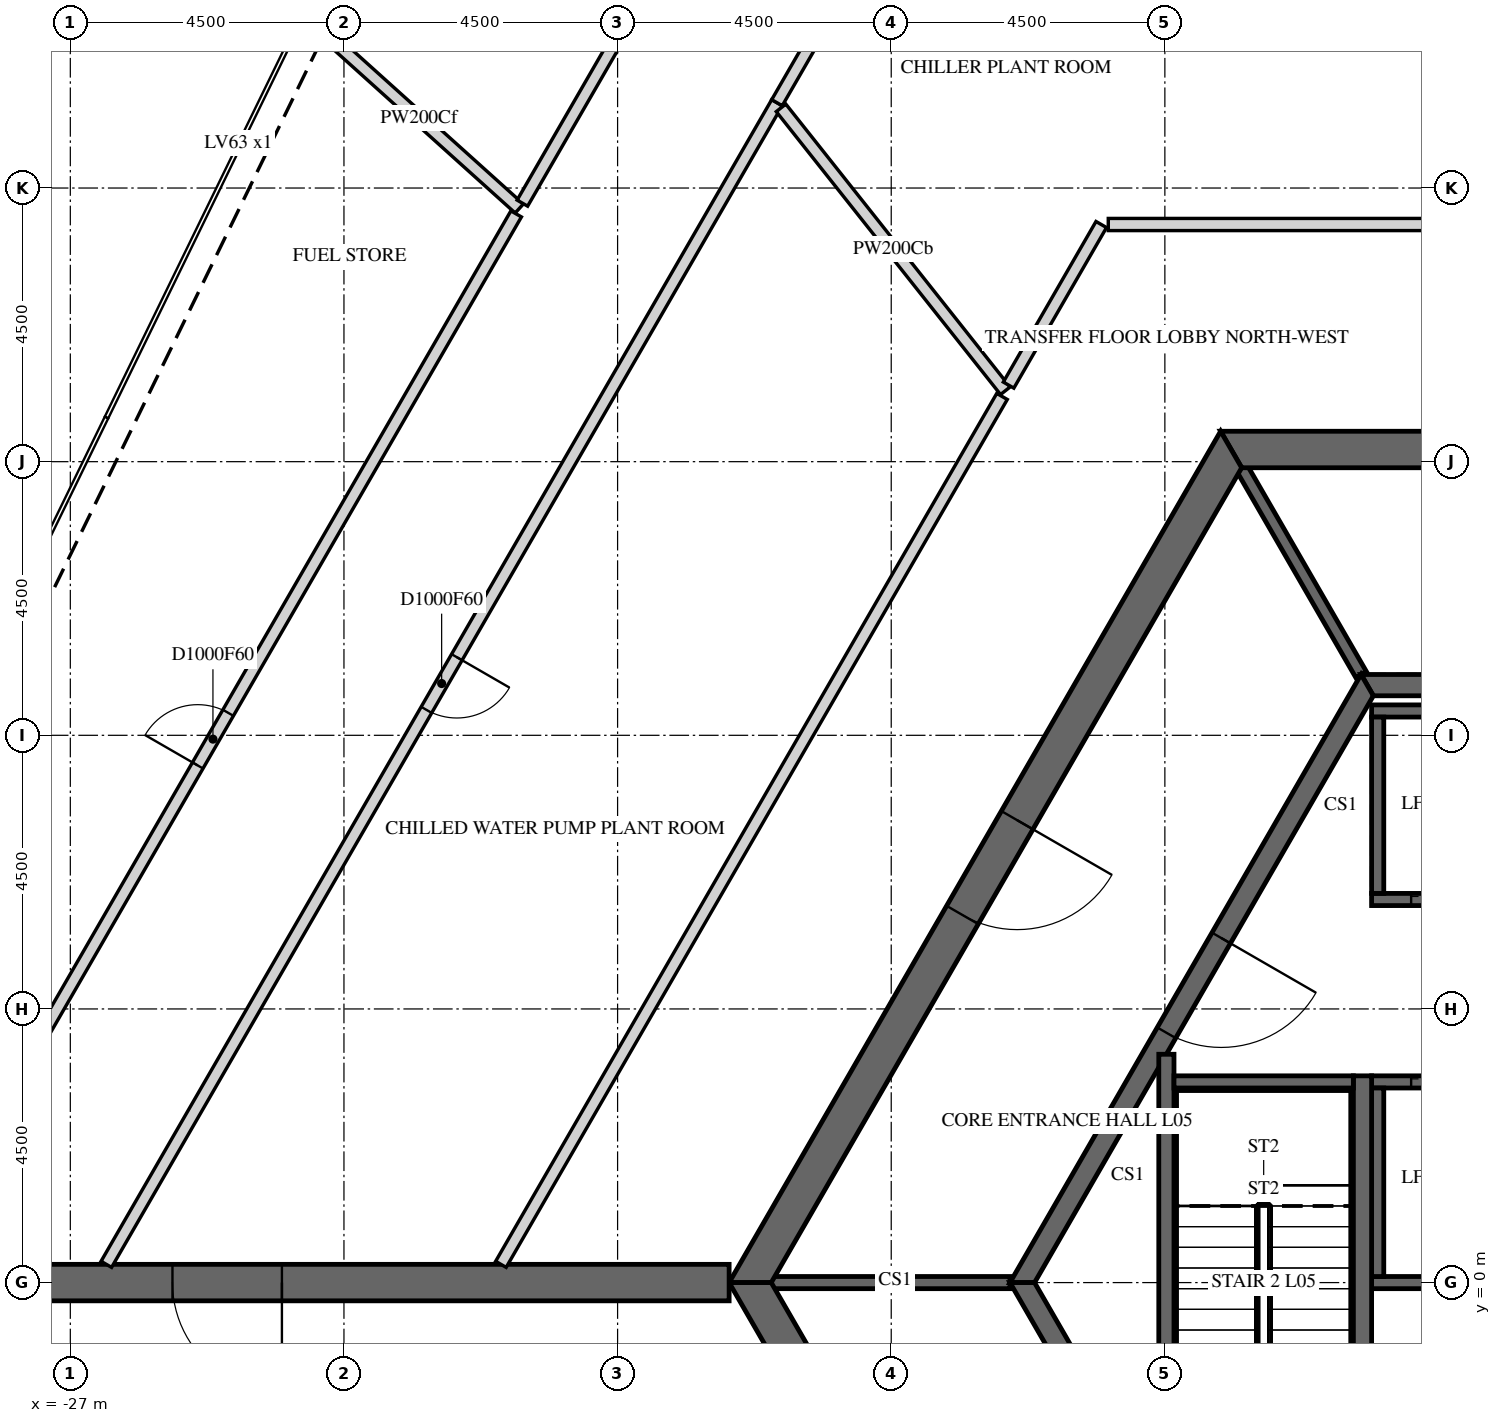
"""IFC4 building model, lengths in metres.
Left out: names, types, materials, properties, quantities, classifications, styles, units other than length and angle.
Written with IfcOpenShell. Run it as: python <this file> out.ifc"""

import sys

from ifc_helpers import new_model, si_unit, direction, frame, frame_2d, origin, place, context, subcontext, project, spatial, polyline, rectangle, outline, extrude, element, fill, save


model = new_model("IFC4")
c1 = context("Model", 3, precision=1e-05, world=origin(), true_north=direction((0.0, 1.0)))
c2 = subcontext(c1, "Body", "Model", "MODEL_VIEW")
j1 = project(units=[si_unit("LENGTHUNIT", "METRE"), si_unit("PLANEANGLEUNIT", "RADIAN")], contexts=[c1])
p1 = place(None, origin())
s1 = spatial("IfcSite", under=j1, at=p1, CompositionType="ELEMENT")
p2 = place(p1, origin())
s2 = spatial("IfcBuilding", under=s1, at=p2, CompositionType="ELEMENT")
p3 = place(p2, frame((0.0, 0.0, 31.5)))
s3 = spatial("IfcBuildingStorey", under=s2, at=p3, CompositionType="ELEMENT", Elevation=31.5)
p4 = place(p3, frame((-7.91, 13.7, -0.3), z_axis=(0.0, 0.0, 1.0), x_axis=(-0.499999880136, -0.866025472988, 0.0)))
e1 = element("IfcWall", 1, at=p4, inside=s3, PredefinedType="SHEAR", context=c2, shape_type="SweptSolid", body=[
    extrude(outline(polyline([(-0.173, -0.3), (15.993, -0.3), (15.646, 0.3), (0.173, 0.3), (-0.173, -0.3)])), origin(), (0.0, 0.0, 1.0), 6.15),
])
p5 = place(p4, frame((7.039, 0.0, 0.3)))
e2 = element("IfcOpeningElement", 2, at=p5, cuts=e1, PredefinedType="OPENING", context=c2, shape_type="SweptSolid", body=[
    extrude(rectangle(XDim=1.8, YDim=2.4, at=frame_2d((0.9, 1.2))), frame((0.0, 0.31, 0.0), z_axis=(0.0, -1.0, 0.0), x_axis=(1.0, 0.0, 0.0)), (0.0, 0.0, 1.0), 0.62),
])
p6 = place(p3, frame((-15.819, 0.0, -0.3), z_axis=(0.0, 0.0, 1.0), x_axis=(0.499999880136, -0.866025472988, 0.0)))
e3 = element("IfcWall", 3, at=p6, inside=s3, PredefinedType="SHEAR", context=c2, shape_type="SweptSolid", body=[
    extrude(outline(polyline([(-0.173, -0.3), (15.993, -0.3), (15.646, 0.3), (0.173, 0.3), (-0.173, -0.3)])), origin(), (0.0, 0.0, 1.0), 6.15),
])
p7 = place(p6, frame((6.981, 0.0, 0.3)))
e4 = element("IfcOpeningElement", 4, at=p7, cuts=e3, PredefinedType="OPENING", context=c2, shape_type="SweptSolid", body=[
    extrude(rectangle(XDim=1.8, YDim=2.4, at=frame_2d((0.9, 1.2))), frame((0.0, 0.31, 0.0), z_axis=(0.0, -1.0, 0.0), x_axis=(1.0, 0.0, 0.0)), (0.0, 0.0, 1.0), 0.62),
])
p8 = place(p3, frame((7.91, 13.7, -0.3), z_axis=(0.0, 0.0, 1.0), x_axis=(-1.0, 0.0, 0.0)))
e5 = element("IfcWall", 5, at=p8, inside=s3, PredefinedType="SHEAR", context=c2, shape_type="SweptSolid", body=[
    extrude(outline(polyline([(-0.173, -0.3), (15.993, -0.3), (15.646, 0.3), (0.173, 0.3), (-0.173, -0.3)])), origin(), (0.0, 0.0, 1.0), 6.15),
])
p9 = place(p8, frame((7.31, 0.0, 0.3)))
e6 = element("IfcOpeningElement", 6, at=p9, cuts=e5, PredefinedType="OPENING", context=c2, shape_type="SweptSolid", body=[
    extrude(rectangle(XDim=1.2, YDim=2.4, at=frame_2d((0.6, 1.2))), frame((0.0, 0.31, 0.0), z_axis=(0.0, -1.0, 0.0), x_axis=(1.0, 0.0, 0.0)), (0.0, 0.0, 1.0), 0.62),
])
p10 = place(p3, frame((-16.166, 0.0, -0.3), z_axis=(0.0, 0.0, 1.0), x_axis=(-1.0, 0.0, 0.0)))
e7 = element("IfcWall", 7, at=p10, inside=s3, PredefinedType="SHEAR", context=c2, shape_type="SweptSolid", body=[
    extrude(rectangle(XDim=16.509, YDim=0.6, at=frame_2d((8.254, 0.0))), origin(), (0.0, 0.0, 1.0), 6.15),
])
p11 = place(p10, frame((7.354, 0.0, 0.3)))
e8 = element("IfcOpeningElement", 8, at=p11, cuts=e7, PredefinedType="OPENING", context=c2, shape_type="SweptSolid", body=[
    extrude(rectangle(XDim=1.8, YDim=2.4, at=frame_2d((0.9, 1.2))), frame((0.0, 0.31, 0.0), z_axis=(0.0, -1.0, 0.0), x_axis=(1.0, 0.0, 0.0)), (0.0, 0.0, 1.0), 0.62),
])
p12 = place(p3, frame((-5.673, 9.825, -0.3), z_axis=(0.0, 0.0, 1.0), x_axis=(-0.499995046907, -0.866028263435, 0.0)))
e9 = element("IfcWall", 9, at=p12, inside=s3, PredefinedType="SHEAR", context=c2, shape_type="SweptSolid", body=[
    extrude(outline(polyline([(-0.101, -0.175), (11.446, -0.175), (11.244, 0.175), (0.101, 0.175), (-0.101, -0.175)])), origin(), (0.0, 0.0, 1.0), 6.15),
])
p13 = place(p12, frame((4.801, 0.0, 0.3)))
e10 = element("IfcOpeningElement", 10, at=p13, cuts=e9, PredefinedType="OPENING", context=c2, shape_type="SweptSolid", body=[
    extrude(rectangle(XDim=1.8, YDim=2.4, at=frame_2d((0.9, 1.2))), frame((0.0, 0.185, 0.0), z_axis=(0.0, -1.0, 0.0), x_axis=(1.0, 0.0, 0.0)), (0.0, 0.0, 1.0), 0.37),
])
p14 = place(p3, frame((-11.345, 0.0, -0.3), z_axis=(0.0, 0.0, 1.0), x_axis=(0.499995046907, -0.866028263435, 0.0)))
e11 = element("IfcWall", 11, at=p14, inside=s3, PredefinedType="SHEAR", context=c2, shape_type="SweptSolid", body=[
    extrude(outline(polyline([(-0.101, -0.175), (11.446, -0.175), (11.244, 0.175), (0.101, 0.175), (-0.101, -0.175)])), origin(), (0.0, 0.0, 1.0), 6.15),
])
p15 = place(p14, frame((4.744, 0.0, 0.3)))
e12 = element("IfcOpeningElement", 12, at=p15, cuts=e11, PredefinedType="OPENING", context=c2, shape_type="SweptSolid", body=[
    extrude(rectangle(XDim=1.8, YDim=2.4, at=frame_2d((0.9, 1.2))), frame((0.0, 0.185, 0.0), z_axis=(0.0, -1.0, 0.0), x_axis=(1.0, 0.0, 0.0)), (0.0, 0.0, 1.0), 0.37),
])
p16 = place(p3, frame((5.673, 9.825, -0.3), z_axis=(0.0, 0.0, 1.0), x_axis=(-1.0, 0.0, 0.0)))
e13 = element("IfcWall", 13, at=p16, inside=s3, PredefinedType="SHEAR", context=c2, shape_type="SweptSolid", body=[
    extrude(outline(polyline([(-0.101, -0.175), (11.446, -0.175), (11.244, 0.175), (0.101, 0.175), (-0.101, -0.175)])), origin(), (0.0, 0.0, 1.0), 6.15),
])
p17 = place(p3, frame((-5.6, 6.3, -0.25), z_axis=(0.0, 0.0, 1.0), x_axis=(1.0, 0.0, 0.0)))
e14 = element("IfcWall", 14, at=p17, inside=s3, PredefinedType="SHEAR", context=c2, shape_type="SweptSolid", body=[
    extrude(rectangle(XDim=11.2, YDim=0.2, at=frame_2d((5.6, 0.0))), origin(), (0.0, 0.0, 1.0), 6.0),
])
p18 = place(p17, frame((0.65, 0.0, 0.25)))
e15 = element("IfcOpeningElement", 15, at=p18, cuts=e14, PredefinedType="OPENING", context=c2, shape_type="SweptSolid", body=[
    extrude(rectangle(XDim=1.1, YDim=2.1, at=frame_2d((0.55, 1.05))), frame((0.0, 0.11, 0.0), z_axis=(0.0, -1.0, 0.0), x_axis=(1.0, 0.0, 0.0)), (0.0, 0.0, 1.0), 0.22),
])
p19 = place(p17, frame((2.85, 0.0, 0.25)))
e16 = element("IfcOpeningElement", 16, at=p19, cuts=e14, PredefinedType="OPENING", context=c2, shape_type="SweptSolid", body=[
    extrude(rectangle(XDim=1.1, YDim=2.1, at=frame_2d((0.55, 1.05))), frame((0.0, 0.11, 0.0), z_axis=(0.0, -1.0, 0.0), x_axis=(1.0, 0.0, 0.0)), (0.0, 0.0, 1.0), 0.22),
])
p20 = place(p17, frame((5.05, 0.0, 0.25)))
e17 = element("IfcOpeningElement", 17, at=p20, cuts=e14, PredefinedType="OPENING", context=c2, shape_type="SweptSolid", body=[
    extrude(rectangle(XDim=1.1, YDim=2.1, at=frame_2d((0.55, 1.05))), frame((0.0, 0.11, 0.0), z_axis=(0.0, -1.0, 0.0), x_axis=(1.0, 0.0, 0.0)), (0.0, 0.0, 1.0), 0.22),
])
p21 = place(p17, frame((7.25, 0.0, 0.25)))
e18 = element("IfcOpeningElement", 18, at=p21, cuts=e14, PredefinedType="OPENING", context=c2, shape_type="SweptSolid", body=[
    extrude(rectangle(XDim=1.1, YDim=2.1, at=frame_2d((0.55, 1.05))), frame((0.0, 0.11, 0.0), z_axis=(0.0, -1.0, 0.0), x_axis=(1.0, 0.0, 0.0)), (0.0, 0.0, 1.0), 0.22),
])
p22 = place(p17, frame((9.45, 0.0, 0.25)))
e19 = element("IfcOpeningElement", 19, at=p22, cuts=e14, PredefinedType="OPENING", context=c2, shape_type="SweptSolid", body=[
    extrude(rectangle(XDim=1.1, YDim=2.1, at=frame_2d((0.55, 1.05))), frame((0.0, 0.11, 0.0), z_axis=(0.0, -1.0, 0.0), x_axis=(1.0, 0.0, 0.0)), (0.0, 0.0, 1.0), 0.22),
])
p23 = place(p3, frame((-5.6, 9.4, -0.25), z_axis=(0.0, 0.0, 1.0), x_axis=(1.0, 0.0, 0.0)))
e20 = element("IfcWall", 20, at=p23, inside=s3, PredefinedType="SHEAR", context=c2, shape_type="SweptSolid", body=[
    extrude(rectangle(XDim=11.2, YDim=0.2, at=frame_2d((5.6, 0.0))), origin(), (0.0, 0.0, 1.0), 6.0),
])
p24 = place(p3, frame((-5.5, 6.4, -0.25), z_axis=(0.0, 0.0, 1.0), x_axis=(0.0, 1.0, 0.0)))
e21 = element("IfcWall", 21, at=p24, inside=s3, PredefinedType="SHEAR", context=c2, shape_type="SweptSolid", body=[
    extrude(rectangle(XDim=2.9, YDim=0.2, at=frame_2d((1.45, 0.0))), origin(), (0.0, 0.0, 1.0), 6.0),
])
p25 = place(p3, frame((-5.6, 3.3, -0.25), z_axis=(0.0, 0.0, 1.0), x_axis=(1.0, 0.0, 0.0)))
e22 = element("IfcWall", 22, at=p25, inside=s3, PredefinedType="SHEAR", context=c2, shape_type="SweptSolid", body=[
    extrude(rectangle(XDim=11.2, YDim=0.2, at=frame_2d((5.6, 0.0))), origin(), (0.0, 0.0, 1.0), 6.0),
])
p26 = place(p25, frame((0.65, 0.0, 0.25)))
e23 = element("IfcOpeningElement", 23, at=p26, cuts=e22, PredefinedType="OPENING", context=c2, shape_type="SweptSolid", body=[
    extrude(rectangle(XDim=1.1, YDim=2.1, at=frame_2d((0.55, 1.05))), frame((0.0, 0.11, 0.0), z_axis=(0.0, -1.0, 0.0), x_axis=(1.0, 0.0, 0.0)), (0.0, 0.0, 1.0), 0.22),
])
p27 = place(p25, frame((2.85, 0.0, 0.25)))
e24 = element("IfcOpeningElement", 24, at=p27, cuts=e22, PredefinedType="OPENING", context=c2, shape_type="SweptSolid", body=[
    extrude(rectangle(XDim=1.1, YDim=2.1, at=frame_2d((0.55, 1.05))), frame((0.0, 0.11, 0.0), z_axis=(0.0, -1.0, 0.0), x_axis=(1.0, 0.0, 0.0)), (0.0, 0.0, 1.0), 0.22),
])
p28 = place(p25, frame((5.05, 0.0, 0.25)))
e25 = element("IfcOpeningElement", 25, at=p28, cuts=e22, PredefinedType="OPENING", context=c2, shape_type="SweptSolid", body=[
    extrude(rectangle(XDim=1.1, YDim=2.1, at=frame_2d((0.55, 1.05))), frame((0.0, 0.11, 0.0), z_axis=(0.0, -1.0, 0.0), x_axis=(1.0, 0.0, 0.0)), (0.0, 0.0, 1.0), 0.22),
])
p29 = place(p25, frame((7.25, 0.0, 0.25)))
e26 = element("IfcOpeningElement", 26, at=p29, cuts=e22, PredefinedType="OPENING", context=c2, shape_type="SweptSolid", body=[
    extrude(rectangle(XDim=1.1, YDim=2.1, at=frame_2d((0.55, 1.05))), frame((0.0, 0.11, 0.0), z_axis=(0.0, -1.0, 0.0), x_axis=(1.0, 0.0, 0.0)), (0.0, 0.0, 1.0), 0.22),
])
p30 = place(p25, frame((9.45, 0.0, 0.25)))
e27 = element("IfcOpeningElement", 27, at=p30, cuts=e22, PredefinedType="OPENING", context=c2, shape_type="SweptSolid", body=[
    extrude(rectangle(XDim=1.1, YDim=2.1, at=frame_2d((0.55, 1.05))), frame((0.0, 0.11, 0.0), z_axis=(0.0, -1.0, 0.0), x_axis=(1.0, 0.0, 0.0)), (0.0, 0.0, 1.0), 0.22),
])
p31 = place(p3, frame((-5.6, 0.0, -0.25), z_axis=(0.0, 0.0, 1.0), x_axis=(1.0, 0.0, 0.0)))
e28 = element("IfcWall", 28, at=p31, inside=s3, PredefinedType="SHEAR", context=c2, shape_type="SweptSolid", body=[
    extrude(rectangle(XDim=11.2, YDim=0.2, at=frame_2d((5.6, 0.0))), origin(), (0.0, 0.0, 1.0), 6.0),
])
p32 = place(p3, frame((-5.5, 0.1, -0.25), z_axis=(0.0, 0.0, 1.0), x_axis=(0.0, 1.0, 0.0)))
e29 = element("IfcWall", 29, at=p32, inside=s3, PredefinedType="SHEAR", context=c2, shape_type="SweptSolid", body=[
    extrude(rectangle(XDim=3.1, YDim=0.2, at=frame_2d((1.55, 0.0))), origin(), (0.0, 0.0, 1.0), 6.0),
])
p33 = place(p3, frame((-5.773, 10.0, -0.3), z_axis=(0.0, 0.0, 1.0), x_axis=(-0.500038251005, 0.86600331843, 0.0)))
e30 = element("IfcWall", 30, at=p33, inside=s3, PredefinedType="SHEAR", context=c2, shape_type="SweptSolid", body=[
    extrude(rectangle(XDim=3.926, YDim=0.2, at=frame_2d((1.963, 0.0))), origin(), (0.0, 0.0, 1.0), 6.15),
])
p34 = place(p3, frame((-11.547, 0.0, -0.3), z_axis=(0.0, 0.0, 1.0), x_axis=(-1.0, 0.0, 0.0)))
e31 = element("IfcWall", 31, at=p34, inside=s3, PredefinedType="SHEAR", context=c2, shape_type="SweptSolid", body=[
    extrude(rectangle(XDim=3.926, YDim=0.2, at=frame_2d((1.963, 0.0))), origin(), (0.0, 0.0, 1.0), 6.15),
])
p35 = place(p3, frame((-5.75, -3.4, -0.25), z_axis=(0.0, 0.0, 1.0), x_axis=(0.0, 1.0, 0.0)))
e32 = element("IfcWall", 32, at=p35, inside=s3, PredefinedType="SHEAR", context=c2, shape_type="SweptSolid", body=[
    extrude(rectangle(XDim=6.8, YDim=0.3, at=frame_2d((3.4, 0.0))), origin(), (0.0, 0.0, 1.0), 6.0),
])
p36 = place(p3, frame((-8.975, -3.755, -0.25), z_axis=(0.0, 0.0, 1.0), x_axis=(0.0, 1.0, 0.0)))
e33 = element("IfcWall", 33, at=p36, inside=s3, PredefinedType="SHEAR", context=c2, shape_type="SweptSolid", body=[
    extrude(rectangle(XDim=7.51, YDim=0.25, at=frame_2d((3.755, 0.0))), origin(), (0.0, 0.0, 1.0), 6.0),
])
p37 = place(p3, frame((-8.85, 3.3, -0.25), z_axis=(0.0, 0.0, 1.0), x_axis=(1.0, 0.0, 0.0)))
e34 = element("IfcWall", 34, at=p37, inside=s3, PredefinedType="SHEAR", context=c2, shape_type="SweptSolid", body=[
    extrude(rectangle(XDim=2.95, YDim=0.2, at=frame_2d((1.475, 0.0))), origin(), (0.0, 0.0, 1.0), 6.0),
])
p38 = place(p3, frame((-15.379, 19.403, 0.0), z_axis=(0.0, 0.0, 1.0), x_axis=(-0.499997101594, -0.866027077174, 0.0)))
e35 = element("IfcWall", 35, at=p38, inside=s3, PredefinedType="PARTITIONING", context=c2, shape_type="SweptSolid", body=[
    extrude(rectangle(XDim=22.058, YDim=0.2, at=frame_2d((11.029, 0.0))), origin(), (0.0, 0.0, 1.0), 5.85),
])
p39 = place(p38, frame((10.529, 0.0, 0.0)))
e36 = element("IfcOpeningElement", 36, at=p39, cuts=e35, PredefinedType="OPENING", context=c2, shape_type="SweptSolid", body=[
    extrude(rectangle(XDim=1.0, YDim=2.1, at=frame_2d((0.5, 1.05))), frame((0.0, 0.11, 0.0), z_axis=(0.0, -1.0, 0.0), x_axis=(1.0, 0.0, 0.0)), (0.0, 0.0, 1.0), 0.22),
])
p40 = place(p3, frame((-22.917, 20.634, 0.0), z_axis=(0.0, 0.0, 1.0), x_axis=(0.74319570957, -0.669074089527, 0.0)))
e37 = element("IfcWall", 37, at=p40, inside=s3, PredefinedType="PARTITIONING", context=c2, shape_type="SweptSolid", body=[
    extrude(rectangle(XDim=4.44, YDim=0.2, at=frame_2d((2.22, 0.0))), origin(), (0.0, 0.0, 1.0), 5.088),
])
p41 = place(p3, frame((-29.641, 0.3, 0.0), z_axis=(0.0, 0.0, 1.0), x_axis=(0.49998168022, 0.866035980456, 0.0)))
e38 = element("IfcWall", 38, at=p41, inside=s3, PredefinedType="PARTITIONING", context=c2, shape_type="SweptSolid", body=[
    extrude(rectangle(XDim=19.947, YDim=0.2, at=frame_2d((9.973, 0.0))), origin(), (0.0, 0.0, 1.0), 5.85),
])
p42 = place(p41, frame((9.473, 0.0, 0.0)))
e39 = element("IfcOpeningElement", 39, at=p42, cuts=e38, PredefinedType="OPENING", context=c2, shape_type="SweptSolid", body=[
    extrude(rectangle(XDim=1.0, YDim=2.1, at=frame_2d((0.5, 1.05))), frame((0.0, 0.11, 0.0), z_axis=(0.0, -1.0, 0.0), x_axis=(1.0, 0.0, 0.0)), (0.0, 0.0, 1.0), 0.22),
])
p43 = place(p3, frame((-15.379, 19.403, 0.0), z_axis=(0.0, 0.0, 1.0), x_axis=(0.499936677724, 0.866061959831, 0.0)))
e40 = element("IfcWall", 40, at=p43, inside=s3, PredefinedType="PARTITIONING", context=c2, shape_type="SweptSolid", body=[
    extrude(rectangle(XDim=4.176, YDim=0.2, at=frame_2d((2.088, 0.0))), origin(), (0.0, 0.0, 1.0), 5.85),
])
p44 = place(p3, frame((-15.312, 19.319, 0.0), z_axis=(0.0, 0.0, 1.0), x_axis=(0.62121364233, -0.7836412512, 0.0)))
e41 = element("IfcWall", 41, at=p44, inside=s3, PredefinedType="PARTITIONING", context=c2, shape_type="SweptSolid", body=[
    extrude(rectangle(XDim=5.937, YDim=0.2, at=frame_2d((2.969, 0.0))), origin(), (0.0, 0.0, 1.0), 5.85),
])
p45 = place(p3, frame((-14.907, 25.82, 0.0), z_axis=(0.0, 0.0, 1.0), x_axis=(-0.500042271362, -0.866000997026, 0.0)))
e42 = element("IfcWall", 42, at=p45, inside=s3, PredefinedType="PARTITIONING", context=c2, shape_type="SweptSolid", body=[
    extrude(rectangle(XDim=9.317, YDim=0.2, at=frame_2d((4.659, 0.0))), origin(), (0.0, 0.0, 1.0), 5.85),
])
p46 = place(p3, frame((-11.678, 14.573, 0.0), z_axis=(0.0, 0.0, 1.0), x_axis=(-0.500039172404, -0.866002786405, 0.0)))
e43 = element("IfcWall", 43, at=p46, inside=s3, PredefinedType="PARTITIONING", context=c2, shape_type="SweptSolid", body=[
    extrude(rectangle(XDim=16.481, YDim=0.2, at=frame_2d((8.241, 0.0))), origin(), (0.0, 0.0, 1.0), 5.85),
])
p47 = place(p3, frame((-10.046, 17.4, 0.0), z_axis=(0.0, 0.0, 1.0), x_axis=(-0.499928067852, -0.866066929846, 0.0)))
e44 = element("IfcWall", 44, at=p47, inside=s3, PredefinedType="PARTITIONING", context=c2, shape_type="SweptSolid", body=[
    extrude(rectangle(XDim=3.049, YDim=0.2, at=frame_2d((1.525, 0.0))), origin(), (0.0, 0.0, 1.0), 5.85),
])
p48 = place(p3, frame((6.889, 17.4, 0.0), z_axis=(0.0, 0.0, 1.0), x_axis=(-1.0, 0.0, 0.0)))
e45 = element("IfcWall", 45, at=p48, inside=s3, PredefinedType="PARTITIONING", context=c2, shape_type="SweptSolid", body=[
    extrude(rectangle(XDim=16.819, YDim=0.2, at=frame_2d((8.41, 0.0))), origin(), (0.0, 0.0, 1.0), 5.85),
])
p49 = place(p5, origin())
e46 = element("IfcDoor", 46, at=p49, inside=s3, OperationType="DOUBLE_DOOR_SINGLE_SWING", PredefinedType="DOOR", context=c2, shape_type="SweptSolid", body=[
    extrude(rectangle(XDim=1.8, YDim=2.4, at=frame_2d((0.9, 1.2))), frame((0.0, 0.025, 0.0), z_axis=(0.0, -1.0, 0.0), x_axis=(1.0, 0.0, 0.0)), (0.0, 0.0, 1.0), 0.05),
])
fill(e2, e46)
p50 = place(p11, origin())
e47 = element("IfcDoor", 47, at=p50, inside=s3, OperationType="DOUBLE_DOOR_SINGLE_SWING", PredefinedType="DOOR", context=c2, shape_type="SweptSolid", body=[
    extrude(rectangle(XDim=1.8, YDim=2.4, at=frame_2d((0.9, 1.2))), frame((0.0, 0.025, 0.0), z_axis=(0.0, -1.0, 0.0), x_axis=(1.0, 0.0, 0.0)), (0.0, 0.0, 1.0), 0.05),
])
fill(e8, e47)
p51 = place(p13, origin())
e48 = element("IfcDoor", 48, at=p51, inside=s3, OperationType="DOUBLE_DOOR_SINGLE_SWING", PredefinedType="DOOR", context=c2, shape_type="SweptSolid", body=[
    extrude(rectangle(XDim=1.8, YDim=2.4, at=frame_2d((0.9, 1.2))), frame((0.0, 0.025, 0.0), z_axis=(0.0, -1.0, 0.0), x_axis=(1.0, 0.0, 0.0)), (0.0, 0.0, 1.0), 0.05),
])
fill(e10, e48)
p52 = place(p18, origin())
e49 = element("IfcDoor", 49, at=p52, inside=s3, OperationType="SLIDING_TO_LEFT", PredefinedType="DOOR", context=c2, shape_type="SweptSolid", body=[
    extrude(rectangle(XDim=1.1, YDim=2.1, at=frame_2d((0.55, 1.05))), frame((0.0, 0.025, 0.0), z_axis=(0.0, -1.0, 0.0), x_axis=(1.0, 0.0, 0.0)), (0.0, 0.0, 1.0), 0.05),
])
fill(e15, e49)
p53 = place(p26, origin())
e50 = element("IfcDoor", 50, at=p53, inside=s3, OperationType="SLIDING_TO_LEFT", PredefinedType="DOOR", context=c2, shape_type="SweptSolid", body=[
    extrude(rectangle(XDim=1.1, YDim=2.1, at=frame_2d((0.55, 1.05))), frame((0.0, 0.025, 0.0), z_axis=(0.0, -1.0, 0.0), x_axis=(1.0, 0.0, 0.0)), (0.0, 0.0, 1.0), 0.05),
])
fill(e23, e50)
p54 = place(p39, origin())
e51 = element("IfcDoor", 51, at=p54, inside=s3, OperationType="SINGLE_SWING_RIGHT", PredefinedType="DOOR", context=c2, shape_type="SweptSolid", body=[
    extrude(rectangle(XDim=1.0, YDim=2.1, at=frame_2d((0.5, 1.05))), frame((0.0, 0.025, 0.0), z_axis=(0.0, -1.0, 0.0), x_axis=(1.0, 0.0, 0.0)), (0.0, 0.0, 1.0), 0.05),
])
fill(e36, e51)
p55 = place(p42, origin())
e52 = element("IfcDoor", 52, at=p55, inside=s3, OperationType="SINGLE_SWING_RIGHT", PredefinedType="DOOR", context=c2, shape_type="SweptSolid", body=[
    extrude(rectangle(XDim=1.0, YDim=2.1, at=frame_2d((0.5, 1.05))), frame((0.0, 0.025, 0.0), z_axis=(0.0, -1.0, 0.0), x_axis=(1.0, 0.0, 0.0)), (0.0, 0.0, 1.0), 0.05),
])
fill(e39, e52)
save(model, sys.argv[1])
